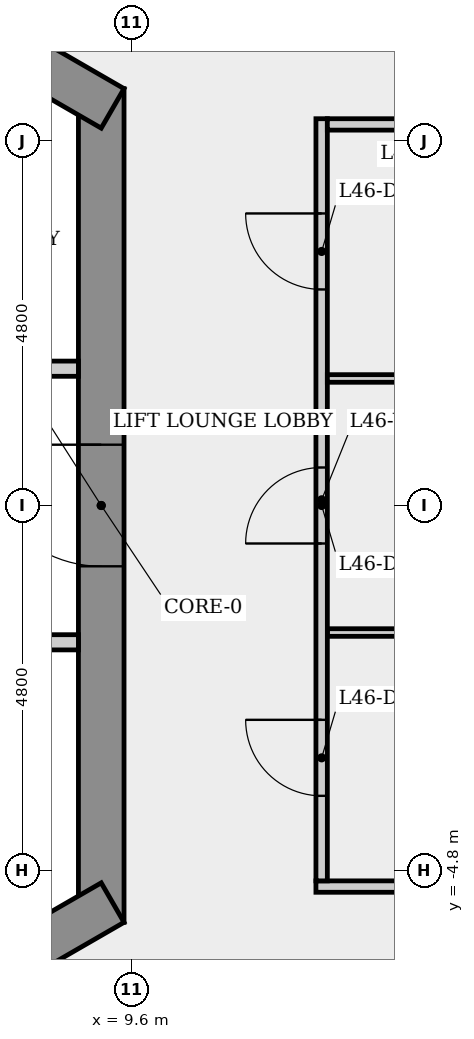
"""IFC4 building model, lengths in metres.
Left out: names, types, materials, properties, quantities, classifications, styles, units other than length and angle.
Written with IfcOpenShell. Run it as: python <this file> out.ifc"""

import sys

from ifc_helpers import new_model, si_unit, direction, frame, frame_2d, origin, place, context, subcontext, project, spatial, rectangle, extrude, element, fill, save


model = new_model("IFC4")
c1 = context("Model", 3, precision=1e-05, world=origin(), true_north=direction((0.0, 1.0)))
c2 = subcontext(c1, "Body", "Model", "MODEL_VIEW")
j1 = project(units=[si_unit("LENGTHUNIT", "METRE"), si_unit("PLANEANGLEUNIT", "RADIAN")], contexts=[c1])
p1 = place(None, origin())
s1 = spatial("IfcSite", under=j1, at=p1, CompositionType="ELEMENT")
p2 = place(p1, origin())
s2 = spatial("IfcBuilding", under=s1, at=p2, CompositionType="ELEMENT")
p3 = place(p2, frame((0.0, 0.0, 173.1)))
s3 = spatial("IfcBuildingStorey", under=s2, at=p3, CompositionType="ELEMENT", Elevation=173.1)
p4 = place(p3, frame((9.2, -5.485, 0.0), z_axis=(0.0, 0.0, 1.0), x_axis=(0.0, 1.0, 0.0)))
e1 = element("IfcWall", 1, at=p4, inside=s3, PredefinedType="SHEAR", context=c2, shape_type="SweptSolid", body=[
    extrude(rectangle(XDim=10.97, YDim=0.6, at=frame_2d((5.485, 0.0))), origin(), (0.0, 0.0, 1.0), 3.4),
])
p5 = place(p4, frame((4.685, 0.0, 0.0)))
e2 = element("IfcOpeningElement", 2, at=p5, cuts=e1, PredefinedType="OPENING", context=c2, shape_type="SweptSolid", body=[
    extrude(rectangle(XDim=1.6, YDim=2.1, at=frame_2d((0.8, 1.05))), frame((0.0, 0.31, 0.0), z_axis=(0.0, -1.0, 0.0), x_axis=(1.0, 0.0, 0.0)), (0.0, 0.0, 1.0), 0.62),
])
p6 = place(p3, frame((9.35, 5.225, 0.0), z_axis=(0.0, 0.0, 1.0), x_axis=(-0.866023993627, 0.500002442456, 0.0)))
e3 = element("IfcWall", 3, at=p6, inside=s3, PredefinedType="SHEAR", context=c2, shape_type="SweptSolid", body=[
    extrude(rectangle(XDim=10.97, YDim=0.6, at=frame_2d((5.485, 0.0))), origin(), (0.0, 0.0, 1.0), 3.4),
])
p7 = place(p6, frame((8.325, 0.0, 0.0)))
e4 = element("IfcOpeningElement", 4, at=p7, cuts=e3, PredefinedType="OPENING", context=c2, shape_type="SweptSolid", body=[
    extrude(rectangle(XDim=0.9, YDim=2.1, at=frame_2d((0.45, 1.05))), frame((0.0, 0.31, 0.0), z_axis=(0.0, -1.0, 0.0), x_axis=(1.0, 0.0, 0.0)), (0.0, 0.0, 1.0), 0.62),
])
p8 = place(p6, frame((1.518, 0.0, 0.0)))
e5 = element("IfcOpeningElement", 5, at=p8, cuts=e3, PredefinedType="OPENING", context=c2, shape_type="SweptSolid", body=[
    extrude(rectangle(XDim=0.9, YDim=2.1, at=frame_2d((0.45, 1.05))), frame((0.0, 0.31, 0.0), z_axis=(0.0, -1.0, 0.0), x_axis=(1.0, 0.0, 0.0)), (0.0, 0.0, 1.0), 0.62),
])
p9 = place(p3, frame((-0.15, -10.71, 0.0), z_axis=(0.0, 0.0, 1.0), x_axis=(0.866023993627, 0.500002442456, 0.0)))
e6 = element("IfcWall", 6, at=p9, inside=s3, PredefinedType="SHEAR", context=c2, shape_type="SweptSolid", body=[
    extrude(rectangle(XDim=10.97, YDim=0.6, at=frame_2d((5.485, 0.0))), origin(), (0.0, 0.0, 1.0), 3.4),
])
p10 = place(p9, frame((6.935, 0.0, 0.0)))
e7 = element("IfcOpeningElement", 7, at=p10, cuts=e6, PredefinedType="OPENING", context=c2, shape_type="SweptSolid", body=[
    extrude(rectangle(XDim=0.9, YDim=2.1, at=frame_2d((0.45, 1.05))), frame((0.0, 0.31, 0.0), z_axis=(0.0, -1.0, 0.0), x_axis=(1.0, 0.0, 0.0)), (0.0, 0.0, 1.0), 0.62),
])
for number, where, z_axis, x_axis in (
    (8, (7.475, 1.8, 0.0), (0.0, 0.0, 1.0), (1.0, 0.0, 0.0)),
    (9, (8.9, -1.8, 0.0), (0.0, 0.0, 1.0), (-1.0, 0.0, 0.0)),
):
    element("IfcWall", number, at=place(p3, frame(where, z_axis=z_axis, x_axis=x_axis)), inside=s3, PredefinedType="PARTITIONING", context=c2, shape_type="SweptSolid", body=[
        extrude(rectangle(XDim=1.425, YDim=0.2, at=frame_2d((0.712, 0.0))), origin(), (0.0, 0.0, 1.0), 3.05),
    ])
p11 = place(p3, frame((12.025, -5.014, 0.0), z_axis=(0.0, 0.0, 1.0), x_axis=(1.0, 0.0, 0.0)))
e10 = element("IfcWall", 10, at=p11, inside=s3, PredefinedType="PARTITIONING", context=c2, shape_type="SweptSolid", body=[
    extrude(rectangle(XDim=3.781, YDim=0.15, at=frame_2d((1.891, 0.0))), origin(), (0.0, 0.0, 1.0), 3.05),
])
p12 = place(p3, frame((12.175, -1.671, 0.0), z_axis=(0.0, 0.0, 1.0), x_axis=(1.0, 0.0, 0.0)))
e11 = element("IfcWall", 11, at=p12, inside=s3, PredefinedType="PARTITIONING", context=c2, shape_type="SweptSolid", body=[
    extrude(rectangle(XDim=6.011, YDim=0.1, at=frame_2d((3.006, 0.0))), origin(), (0.0, 0.0, 1.0), 3.05),
])
p13 = place(p3, frame((12.1, -4.939, 0.0), z_axis=(0.0, 0.0, 1.0), x_axis=(0.0, 1.0, 0.0)))
e12 = element("IfcWall", 12, at=p13, inside=s3, PredefinedType="PARTITIONING", context=c2, shape_type="SweptSolid", body=[
    extrude(rectangle(XDim=10.028, YDim=0.15, at=frame_2d((5.014, 0.0))), origin(), (0.0, 0.0, 1.0), 3.05),
])
p14 = place(p13, frame((1.119, 0.0, 0.0)))
e13 = element("IfcOpeningElement", 13, at=p14, cuts=e12, PredefinedType="OPENING", context=c2, shape_type="SweptSolid", body=[
    extrude(rectangle(XDim=1.0, YDim=2.1, at=frame_2d((0.5, 1.05))), frame((0.0, 0.085, 0.0), z_axis=(0.0, -1.0, 0.0), x_axis=(1.0, 0.0, 0.0)), (0.0, 0.0, 1.0), 0.17),
])
p15 = place(p13, frame((4.439, 0.0, 0.0)))
e14 = element("IfcOpeningElement", 14, at=p15, cuts=e12, PredefinedType="OPENING", context=c2, shape_type="SweptSolid", body=[
    extrude(rectangle(XDim=1.0, YDim=2.1, at=frame_2d((0.5, 1.05))), frame((0.0, 0.085, 0.0), z_axis=(0.0, -1.0, 0.0), x_axis=(1.0, 0.0, 0.0)), (0.0, 0.0, 1.0), 0.17),
])
p16 = place(p13, frame((7.782, 0.0, 0.0)))
e15 = element("IfcOpeningElement", 15, at=p16, cuts=e12, PredefinedType="OPENING", context=c2, shape_type="SweptSolid", body=[
    extrude(rectangle(XDim=1.0, YDim=2.1, at=frame_2d((0.5, 1.05))), frame((0.0, 0.085, 0.0), z_axis=(0.0, -1.0, 0.0), x_axis=(1.0, 0.0, 0.0)), (0.0, 0.0, 1.0), 0.17),
])
p17 = place(p3, frame((12.175, 1.671, 0.0), z_axis=(0.0, 0.0, 1.0), x_axis=(1.0, 0.0, 0.0)))
e16 = element("IfcWall", 16, at=p17, inside=s3, PredefinedType="PARTITIONING", context=c2, shape_type="SweptSolid", body=[
    extrude(rectangle(XDim=6.011, YDim=0.1, at=frame_2d((3.006, 0.0))), origin(), (0.0, 0.0, 1.0), 3.05),
])
p18 = place(p3, frame((15.656, 5.014, 0.0), z_axis=(0.0, 0.0, 1.0), x_axis=(-1.0, 0.0, 0.0)))
e17 = element("IfcWall", 17, at=p18, inside=s3, PredefinedType="PARTITIONING", context=c2, shape_type="SweptSolid", body=[
    extrude(rectangle(XDim=3.481, YDim=0.15, at=frame_2d((1.74, 0.0))), origin(), (0.0, 0.0, 1.0), 3.05),
])
p19 = place(p3, frame((15.693, -5.079, 0.0), z_axis=(0.0, 0.0, 1.0), x_axis=(-0.500009219579, -0.866020080793, 0.0)))
e18 = element("IfcWall", 18, at=p19, inside=s3, PredefinedType="PARTITIONING", context=c2, shape_type="SweptSolid", body=[
    extrude(rectangle(XDim=7.836, YDim=0.15, at=frame_2d((3.918, 0.0))), origin(), (0.0, 0.0, 1.0), 3.05),
])
p20 = place(p19, frame((3.418, 0.0, 0.0)))
e19 = element("IfcOpeningElement", 19, at=p20, cuts=e18, PredefinedType="OPENING", context=c2, shape_type="SweptSolid", body=[
    extrude(rectangle(XDim=1.0, YDim=2.1, at=frame_2d((0.5, 1.05))), frame((0.0, 0.085, 0.0), z_axis=(0.0, -1.0, 0.0), x_axis=(1.0, 0.0, 0.0)), (0.0, 0.0, 1.0), 0.17),
])
p21 = place(p14, origin())
e20 = element("IfcDoor", 20, at=p21, inside=s3, OperationType="SINGLE_SWING_RIGHT", PredefinedType="DOOR", context=c2, shape_type="SweptSolid", body=[
    extrude(rectangle(XDim=1.0, YDim=2.1, at=frame_2d((0.5, 1.05))), frame((0.0, 0.025, 0.0), z_axis=(0.0, -1.0, 0.0), x_axis=(1.0, 0.0, 0.0)), (0.0, 0.0, 1.0), 0.05),
])
fill(e13, e20)
p22 = place(p15, origin())
e21 = element("IfcDoor", 21, at=p22, inside=s3, OperationType="SINGLE_SWING_LEFT", PredefinedType="DOOR", context=c2, shape_type="SweptSolid", body=[
    extrude(rectangle(XDim=1.0, YDim=2.1, at=frame_2d((0.5, 1.05))), frame((0.0, 0.025, 0.0), z_axis=(0.0, -1.0, 0.0), x_axis=(1.0, 0.0, 0.0)), (0.0, 0.0, 1.0), 0.05),
])
fill(e14, e21)
p23 = place(p16, origin())
e22 = element("IfcDoor", 22, at=p23, inside=s3, OperationType="SINGLE_SWING_RIGHT", PredefinedType="DOOR", context=c2, shape_type="SweptSolid", body=[
    extrude(rectangle(XDim=1.0, YDim=2.1, at=frame_2d((0.5, 1.05))), frame((0.0, 0.025, 0.0), z_axis=(0.0, -1.0, 0.0), x_axis=(1.0, 0.0, 0.0)), (0.0, 0.0, 1.0), 0.05),
])
fill(e15, e22)
p24 = place(p5, origin())
e23 = element("IfcDoor", 23, at=p24, inside=s3, OperationType="SINGLE_SWING_RIGHT", PredefinedType="DOOR", context=c2, shape_type="SweptSolid", body=[
    extrude(rectangle(XDim=1.6, YDim=2.1, at=frame_2d((0.8, 1.05))), frame((0.0, 0.025, 0.0), z_axis=(0.0, -1.0, 0.0), x_axis=(1.0, 0.0, 0.0)), (0.0, 0.0, 1.0), 0.05),
])
fill(e2, e23)
save(model, sys.argv[1])
